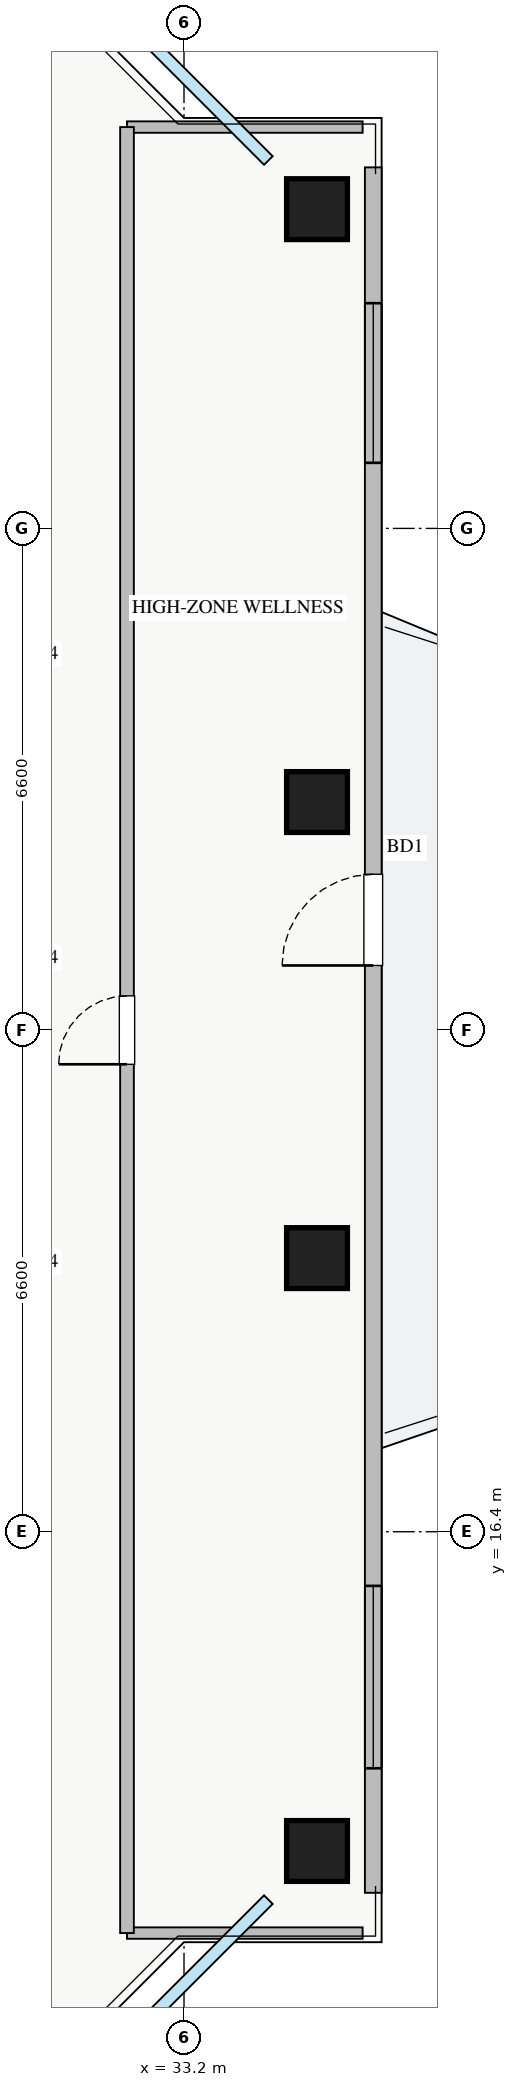
"""IFC4 building model, lengths in metres.
Left out: names, types, materials, properties, quantities, classifications, styles, units other than length and angle.
Written with IfcOpenShell. Run it as: python <this file> out.ifc"""

import sys

from ifc_helpers import new_model, si_unit, direction, frame, frame_2d, origin, origin_2d, place, context, subcontext, project, spatial, rectangle, extrude, source, transform, mapped, element, fill, save


model = new_model("IFC4")
c1 = context("Model", 3, precision=1e-05, world=origin(), true_north=direction((0.0, 1.0)))
c2 = subcontext(c1, "Body", "Model", "MODEL_VIEW")
j1 = project(units=[si_unit("LENGTHUNIT", "METRE"), si_unit("PLANEANGLEUNIT", "RADIAN")], contexts=[c1])
p1 = place(None, origin())
s1 = spatial("IfcSite", under=j1, at=p1, CompositionType="ELEMENT")
p2 = place(p1, origin())
s2 = spatial("IfcBuilding", under=s1, at=p2, CompositionType="ELEMENT")
p3 = place(p2, frame((0.0, 0.0, 219.75)))
s3 = spatial("IfcBuildingStorey", under=s2, at=p3, CompositionType="ELEMENT", Elevation=219.75)
m1 = source(origin(), c2, "Body", "SweptSolid", [
    extrude(rectangle(XDim=0.8, YDim=0.8, at=origin_2d()), origin(), (0.0, 0.0, 1.0), 3.25),
])
for number, where, z_axis, x_axis in (
    (1, (34.95, 12.2, 0.0), (0.0, 0.0, 1.0), (1.0, 0.0, 0.0)),
    (2, (34.95, 20.0, 0.0), (0.0, 0.0, 1.0), (1.0, 0.0, 0.0)),
    (3, (34.95, 26.0, 0.0), (0.0, 0.0, 1.0), (1.0, 0.0, 0.0)),
    (4, (34.95, 33.8, 0.0), (0.0, 0.0, 1.0), (1.0, 0.0, 0.0)),
):
    element("IfcColumn", number, at=place(p3, frame(where, z_axis=z_axis, x_axis=x_axis)), inside=s3, PredefinedType="COLUMN", context=c2, shape_type="MappedRepresentation", body=[
        mapped(m1, transform((0.0, 0.0, 0.0), x_axis=(1.0, 0.0, 0.0), y_axis=(0.0, 1.0, 0.0), z_axis=(0.0, 0.0, 1.0), scale=1.0)),
    ])
p4 = place(p3, frame((35.69, 11.65, 0.0), z_axis=(0.0, 0.0, 1.0), x_axis=(0.0, 1.0, 0.0)))
e5 = element("IfcWall", 5, at=p4, inside=s3, PredefinedType="STANDARD", context=c2, shape_type="SweptSolid", body=[
    extrude(rectangle(XDim=22.7, YDim=0.22, at=frame_2d((11.35, 0.0))), origin(), (0.0, 0.0, 1.0), 2.61),
])
p5 = place(p4, frame((12.2, 0.0, 0.0)))
e6 = element("IfcOpeningElement", 6, at=p5, cuts=e5, PredefinedType="OPENING", context=c2, shape_type="SweptSolid", body=[
    extrude(rectangle(XDim=1.2, YDim=2.1, at=frame_2d((0.6, 1.05))), frame((0.0, 0.12, 0.0), z_axis=(0.0, -1.0, 0.0), x_axis=(1.0, 0.0, 0.0)), (0.0, 0.0, 1.0), 0.24),
])
p6 = place(p4, frame((1.638, 0.0, 0.9)))
e7 = element("IfcOpeningElement", 7, at=p6, cuts=e5, PredefinedType="OPENING", context=c2, shape_type="SweptSolid", body=[
    extrude(rectangle(XDim=2.4, YDim=1.48, at=frame_2d((1.2, 0.74))), frame((0.0, 0.12, 0.0), z_axis=(0.0, -1.0, 0.0), x_axis=(1.0, 0.0, 0.0)), (0.0, 0.0, 1.0), 0.24),
])
p7 = place(p4, frame((18.813, 0.0, 0.9)))
e8 = element("IfcOpeningElement", 8, at=p7, cuts=e5, PredefinedType="OPENING", context=c2, shape_type="SweptSolid", body=[
    extrude(rectangle(XDim=2.1, YDim=1.48, at=frame_2d((1.05, 0.74))), frame((0.0, 0.12, 0.0), z_axis=(0.0, -1.0, 0.0), x_axis=(1.0, 0.0, 0.0)), (0.0, 0.0, 1.0), 0.24),
])
for number, where, z_axis, x_axis in (
    (9, (32.45, 34.88, 0.0), (0.0, 0.0, 1.0), (1.0, 0.0, 0.0)),
    (10, (32.45, 11.12, 0.0), (0.0, 0.0, 1.0), (1.0, 0.0, 0.0)),
):
    element("IfcWall", number, at=place(p3, frame(where, z_axis=z_axis, x_axis=x_axis)), inside=s3, PredefinedType="PARTITIONING", context=c2, shape_type="SweptSolid", body=[
        extrude(rectangle(XDim=3.1, YDim=0.15, at=frame_2d((1.55, 0.0))), origin(), (0.0, 0.0, 1.0), 3.07),
    ])
p8 = place(p3, frame((32.45, 11.12, 0.0), z_axis=(0.0, 0.0, 1.0), x_axis=(0.0, 1.0, 0.0)))
e11 = element("IfcWall", 11, at=p8, inside=s3, PredefinedType="PARTITIONING", context=c2, shape_type="SweptSolid", body=[
    extrude(rectangle(XDim=23.76, YDim=0.18, at=frame_2d((11.88, 0.0))), origin(), (0.0, 0.0, 1.0), 3.07),
])
p9 = place(p8, frame((11.43, 0.0, 0.0)))
e12 = element("IfcOpeningElement", 12, at=p9, cuts=e11, PredefinedType="OPENING", context=c2, shape_type="SweptSolid", body=[
    extrude(rectangle(XDim=0.9, YDim=2.05, at=frame_2d((0.45, 1.025))), frame((0.0, 0.1, 0.0), z_axis=(0.0, -1.0, 0.0), x_axis=(1.0, 0.0, 0.0)), (0.0, 0.0, 1.0), 0.2),
])
m2 = source(origin(), c2, "Body", "SweptSolid", [
    extrude(rectangle(XDim=1.2, YDim=2.1, at=frame_2d((0.6, 1.05))), frame((0.0, 0.025, 0.0), z_axis=(0.0, -1.0, 0.0), x_axis=(1.0, 0.0, 0.0)), (0.0, 0.0, 1.0), 0.05),
])
p10 = place(p5, origin())
e13 = element("IfcDoor", 13, at=p10, inside=s3, OperationType="SINGLE_SWING_LEFT", PredefinedType="DOOR", context=c2, shape_type="MappedRepresentation", body=[
    mapped(m2, transform((0.0, 0.0, 0.0), x_axis=(1.0, 0.0, 0.0), y_axis=(0.0, 1.0, 0.0), z_axis=(0.0, 0.0, 1.0), scale=1.0)),
])
fill(e6, e13)
m3 = source(origin(), c2, "Body", "SweptSolid", [
    extrude(rectangle(XDim=2.4, YDim=1.48, at=frame_2d((1.2, 0.74))), frame((0.0, 0.03, 0.0), z_axis=(0.0, -1.0, 0.0), x_axis=(1.0, 0.0, 0.0)), (0.0, 0.0, 1.0), 0.06),
])
p11 = place(p6, origin())
e14 = element("IfcWindow", 14, at=p11, inside=s3, PartitioningType="TRIPLE_PANEL_VERTICAL", PredefinedType="WINDOW", context=c2, shape_type="MappedRepresentation", body=[
    mapped(m3, transform((0.0, 0.0, 0.0), x_axis=(1.0, 0.0, 0.0), y_axis=(0.0, 1.0, 0.0), z_axis=(0.0, 0.0, 1.0), scale=1.0)),
])
fill(e7, e14)
m4 = source(origin(), c2, "Body", "SweptSolid", [
    extrude(rectangle(XDim=2.1, YDim=1.48, at=frame_2d((1.05, 0.74))), frame((0.0, 0.03, 0.0), z_axis=(0.0, -1.0, 0.0), x_axis=(1.0, 0.0, 0.0)), (0.0, 0.0, 1.0), 0.06),
])
p12 = place(p7, origin())
e15 = element("IfcWindow", 15, at=p12, inside=s3, PartitioningType="TRIPLE_PANEL_VERTICAL", PredefinedType="WINDOW", context=c2, shape_type="MappedRepresentation", body=[
    mapped(m4, transform((0.0, 0.0, 0.0), x_axis=(1.0, 0.0, 0.0), y_axis=(0.0, 1.0, 0.0), z_axis=(0.0, 0.0, 1.0), scale=1.0)),
])
fill(e8, e15)
m5 = source(origin(), c2, "Body", "SweptSolid", [
    extrude(rectangle(XDim=0.9, YDim=2.05, at=frame_2d((0.45, 1.025))), frame((0.0, 0.025, 0.0), z_axis=(0.0, -1.0, 0.0), x_axis=(1.0, 0.0, 0.0)), (0.0, 0.0, 1.0), 0.05),
])
p13 = place(p9, origin())
e16 = element("IfcDoor", 16, at=p13, inside=s3, OperationType="SINGLE_SWING_LEFT", PredefinedType="DOOR", context=c2, shape_type="MappedRepresentation", body=[
    mapped(m5, transform((0.0, 0.0, 0.0), x_axis=(1.0, 0.0, 0.0), y_axis=(0.0, 1.0, 0.0), z_axis=(0.0, 0.0, 1.0), scale=1.0)),
])
fill(e12, e16)
save(model, sys.argv[1])
